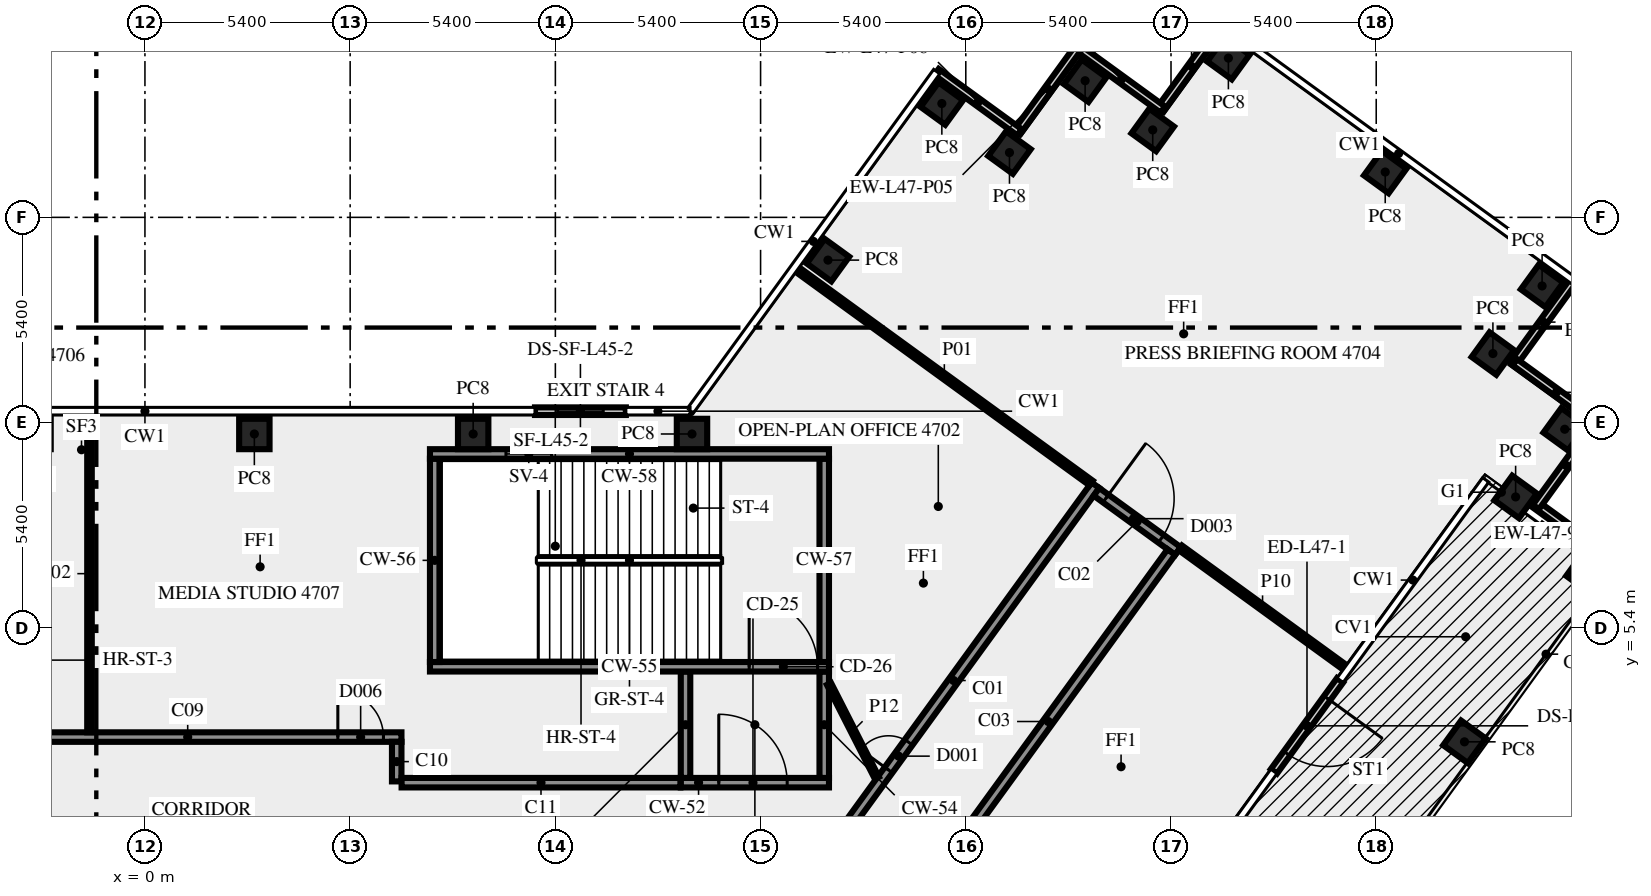
"""IFC4 building model, lengths in metres.
Left out: names, types, materials, properties, quantities, classifications, styles, units other than length and angle.
Written with IfcOpenShell. Run it as: python <this file> out.ifc"""

import sys

from ifc_helpers import new_model, si_unit, direction, frame, frame_2d, origin, origin_2d, place, context, subcontext, project, spatial, rectangle, extrude, element, fill, save


model = new_model("IFC4")
c1 = context("Model", 3, precision=1e-05, world=origin(), true_north=direction((0.0, 1.0)))
c2 = subcontext(c1, "Body", "Model", "MODEL_VIEW")
j1 = project(units=[si_unit("LENGTHUNIT", "METRE"), si_unit("PLANEANGLEUNIT", "RADIAN")], contexts=[c1])
p1 = place(None, origin())
s1 = spatial("IfcSite", under=j1, at=p1, CompositionType="ELEMENT")
p2 = place(p1, origin())
s2 = spatial("IfcBuilding", under=s1, at=p2, CompositionType="ELEMENT")
p3 = place(p2, frame((0.0, 0.0, 202.0)))
s3 = spatial("IfcBuildingStorey", under=s2, at=p3, CompositionType="ELEMENT", Elevation=202.0)
for number, where, z_axis, x_axis in (
    (1, (34.722, 2.4, 0.0), (0.0, 0.0, 1.0), (0.588, 0.809, 0.0)),
    (2, (37.96, 6.855, 0.0), (0.0, 0.0, 1.0), (0.588, 0.809, 0.0)),
    (3, (36.068, 8.844, 0.0), (0.0, 0.0, 1.0), (0.588, 0.809, 0.0)),
    (4, (37.36, 10.625, 0.0), (0.0, 0.0, 1.0), (0.588, 0.809, 0.0)),
    (5, (35.471, 12.616, 0.0), (0.0, 0.0, 1.0), (-0.809, 0.588, 0.0)),
    (6, (36.765, 14.395, 0.0), (0.0, 0.0, 1.0), (-0.809, 0.588, 0.0)),
    (7, (32.637, 17.393, 0.0), (0.0, 0.0, 1.0), (-0.809, 0.588, 0.0)),
    (8, (28.51, 20.39, 0.0), (0.0, 0.0, 1.0), (-0.588, -0.809, 0.0)),
    (9, (26.519, 18.5, 0.0), (0.0, 0.0, 1.0), (-0.809, 0.588, 0.0)),
    (10, (24.74, 19.795, 0.0), (0.0, 0.0, 1.0), (-0.588, -0.809, 0.0)),
    (11, (22.749, 17.904, 0.0), (0.0, 0.0, 1.0), (-0.588, -0.809, 0.0)),
    (12, (20.97, 19.195, 0.0), (0.0, 0.0, 1.0), (-0.588, -0.809, 0.0)),
    (13, (17.974, 15.075, 0.0), (0.0, 0.0, 1.0), (-0.588, -0.809, 0.0)),
    (14, (14.395, 10.5, 0.0), (0.0, 0.0, 1.0), (-1.0, 0.0, 0.0)),
    (15, (8.637, 10.5, 0.0), (0.0, 0.0, 1.0), (-1.0, 0.0, 0.0)),
    (16, (2.879, 10.5, 0.0), (0.0, 0.0, 1.0), (-1.0, 0.0, 0.0)),
):
    element("IfcColumn", number, at=place(p3, frame(where, z_axis=z_axis, x_axis=x_axis)), inside=s3, PredefinedType="COLUMN", context=c2, shape_type="SweptSolid", body=[
        extrude(rectangle(XDim=0.8, YDim=0.8, at=origin_2d()), origin(), (0.0, 0.0, 1.0), 3.65),
    ])
for number, where, z_axis, x_axis in (
    (17, (36.005, 12.352, 0.0), (0.0, 0.0, 1.0), (0.588, 0.809, 0.0)),
    (18, (28.334, 21.262, 0.0), (0.0, 0.0, 1.0), (-0.588, -0.809, 0.0)),
):
    element("IfcWall", number, at=place(p3, frame(where, z_axis=z_axis, x_axis=x_axis)), inside=s3, PredefinedType="SOLIDWALL", context=c2, shape_type="SweptSolid", body=[
        extrude(rectangle(XDim=2.7, YDim=0.2, at=frame_2d((1.35, 0.0))), origin(), (0.0, 0.0, 1.0), 3.65),
    ])
p4 = place(p3, frame((26.785, 19.036, 0.0), z_axis=(0.0, 0.0, 1.0), x_axis=(-0.809064397168, 0.587720002413, 0.0)))
e19 = element("IfcWall", 19, at=p4, inside=s3, PredefinedType="SOLIDWALL", context=c2, shape_type="SweptSolid", body=[
    extrude(rectangle(XDim=2.7, YDim=0.2, at=frame_2d((1.35, 0.0))), origin(), (0.0, 0.0, 1.0), 3.65),
])
for number, where, z_axis, x_axis in (
    (20, (24.563, 20.665, 0.0), (0.0, 0.0, 1.0), (-0.588, -0.809, 0.0)),
    (21, (23.013, 18.438, 0.0), (0.0, 0.0, 1.0), (-0.809, 0.588, 0.0)),
):
    element("IfcWall", number, at=place(p3, frame(where, z_axis=z_axis, x_axis=x_axis)), inside=s3, PredefinedType="SOLIDWALL", context=c2, shape_type="SweptSolid", body=[
        extrude(rectangle(XDim=2.7, YDim=0.2, at=frame_2d((1.35, 0.0))), origin(), (0.0, 0.0, 1.0), 3.65),
    ])
p5 = place(p3, frame((12.655, 11.1, 0.0), z_axis=(0.0, 0.0, 1.0), x_axis=(-1.0, 0.0, 0.0)))
e22 = element("IfcWall", 22, at=p5, inside=s3, PredefinedType="SOLIDWALL", context=c2, shape_type="SweptSolid", body=[
    extrude(rectangle(XDim=2.392, YDim=0.2, at=frame_2d((1.196, 0.0))), origin(), (0.0, 0.0, 1.0), 3.65),
])
p6 = place(p5, frame((0.596, 0.0, 1.0)))
e23 = element("IfcOpeningElement", 23, at=p6, cuts=e22, PredefinedType="OPENING", context=c2, shape_type="SweptSolid", body=[
    extrude(rectangle(XDim=1.2, YDim=1.2, at=frame_2d((0.6, 0.6))), frame((0.0, 0.11, 0.0), z_axis=(0.0, -1.0, 0.0), x_axis=(1.0, 0.0, 0.0)), (0.0, 0.0, 1.0), 0.22),
])
p7 = place(p3, frame((31.449, 4.019, 0.0), z_axis=(0.0, 0.0, 1.0), x_axis=(-0.58782869016, -0.808985433135, 0.0)))
e24 = element("IfcWall", 24, at=p7, inside=s3, PredefinedType="SOLIDWALL", context=c2, shape_type="SweptSolid", body=[
    extrude(rectangle(XDim=2.963, YDim=0.2, at=frame_2d((1.481, 0.0))), origin(), (0.0, 0.0, 1.0), 3.65),
])
p8 = place(p7, frame((0.582, 0.0, 0.0)))
e25 = element("IfcOpeningElement", 25, at=p8, cuts=e24, PredefinedType="OPENING", context=c2, shape_type="SweptSolid", body=[
    extrude(rectangle(XDim=1.8, YDim=2.4, at=frame_2d((0.9, 1.2))), frame((0.0, 0.11, 0.0), z_axis=(0.0, -1.0, 0.0), x_axis=(1.0, 0.0, 0.0)), (0.0, 0.0, 1.0), 0.22),
])
p9 = place(p3, frame((38.748, 7.09, 0.0), z_axis=(0.0, 0.0, 1.0), x_axis=(-0.80901210161, 0.587791986546, 0.0)))
e26 = element("IfcWall", 26, at=p9, inside=s3, PredefinedType="SOLIDWALL", context=c2, shape_type="SweptSolid", body=[
    extrude(rectangle(XDim=2.6, YDim=0.2, at=frame_2d((1.3, 0.0))), origin(), (0.0, 0.0, 1.0), 3.65),
])
for number, where, z_axis, x_axis in (
    (27, (36.602, 8.58, 0.0), (0.0, 0.0, 1.0), (0.588, 0.809, 0.0)),
    (28, (38.231, 10.802, 0.0), (0.0, 0.0, 1.0), (-0.809, 0.588, 0.0)),
):
    element("IfcWall", number, at=place(p3, frame(where, z_axis=z_axis, x_axis=x_axis)), inside=s3, PredefinedType="SOLIDWALL", context=c2, shape_type="SweptSolid", body=[
        extrude(rectangle(XDim=2.7, YDim=0.2, at=frame_2d((1.35, 0.0))), origin(), (0.0, 0.0, 1.0), 3.65),
    ])
p10 = place(p3, frame((14.1, 1.325, 0.0), z_axis=(0.0, 0.0, 1.0), x_axis=(1.0, 0.0, 0.0)))
e29 = element("IfcWall", 29, at=p10, inside=s3, PredefinedType="SHEAR", context=c2, shape_type="SweptSolid", body=[
    extrude(rectangle(XDim=3.9, YDim=0.25, at=frame_2d((1.95, 0.0))), origin(), (0.0, 0.0, 1.0), 3.65),
])
p11 = place(p10, frame((1.0, 0.0, 0.0)))
e30 = element("IfcOpeningElement", 30, at=p11, cuts=e29, PredefinedType="OPENING", context=c2, shape_type="SweptSolid", body=[
    extrude(rectangle(XDim=1.8, YDim=2.1, at=frame_2d((0.9, 1.05))), frame((0.0, 0.135, 0.0), z_axis=(0.0, -1.0, 0.0), x_axis=(1.0, 0.0, 0.0)), (0.0, 0.0, 1.0), 0.27),
])
for number, where, z_axis, x_axis in (
    (31, (14.225, 1.45, 0.0), (0.0, 0.0, 1.0), (0.0, 1.0, 0.0)),
    (32, (17.875, 1.45, 0.0), (0.0, 0.0, 1.0), (0.0, 1.0, 0.0)),
):
    element("IfcWall", number, at=place(p3, frame(where, z_axis=z_axis, x_axis=x_axis)), inside=s3, PredefinedType="SHEAR", context=c2, shape_type="SweptSolid", body=[
        extrude(rectangle(XDim=2.8, YDim=0.25, at=frame_2d((1.4, 0.0))), origin(), (0.0, 0.0, 1.0), 3.65),
    ])
p12 = place(p3, frame((7.5, 4.375, 0.0), z_axis=(0.0, 0.0, 1.0), x_axis=(1.0, 0.0, 0.0)))
e33 = element("IfcWall", 33, at=p12, inside=s3, PredefinedType="SHEAR", context=c2, shape_type="SweptSolid", body=[
    extrude(rectangle(XDim=10.5, YDim=0.25, at=frame_2d((5.25, 0.0))), origin(), (0.0, 0.0, 1.0), 3.65),
])
p13 = place(p12, frame((8.4, 0.0, 0.0)))
e34 = element("IfcOpeningElement", 34, at=p13, cuts=e33, PredefinedType="OPENING", context=c2, shape_type="SweptSolid", body=[
    extrude(rectangle(XDim=1.8, YDim=2.1, at=frame_2d((0.9, 1.05))), frame((0.0, 0.135, 0.0), z_axis=(0.0, -1.0, 0.0), x_axis=(1.0, 0.0, 0.0)), (0.0, 0.0, 1.0), 0.27),
])
for number, where, z_axis, x_axis in (
    (35, (7.625, 4.5, 0.0), (0.0, 0.0, 1.0), (0.0, 1.0, 0.0)),
    (36, (17.875, 4.5, 0.0), (0.0, 0.0, 1.0), (0.0, 1.0, 0.0)),
):
    element("IfcWall", number, at=place(p3, frame(where, z_axis=z_axis, x_axis=x_axis)), inside=s3, PredefinedType="SHEAR", context=c2, shape_type="SweptSolid", body=[
        extrude(rectangle(XDim=5.35, YDim=0.25, at=frame_2d((2.675, 0.0))), origin(), (0.0, 0.0, 1.0), 3.65),
    ])
p14 = place(p3, frame((7.5, 9.975, 0.0), z_axis=(0.0, 0.0, 1.0), x_axis=(1.0, 0.0, 0.0)))
e37 = element("IfcWall", 37, at=p14, inside=s3, PredefinedType="SHEAR", context=c2, shape_type="SweptSolid", body=[
    extrude(rectangle(XDim=10.5, YDim=0.25, at=frame_2d((5.25, 0.0))), origin(), (0.0, 0.0, 1.0), 3.65),
])
p15 = place(p14, frame((2.0, 0.0, 1.0)))
e38 = element("IfcOpeningElement", 38, at=p15, cuts=e37, PredefinedType="OPENING", context=c2, shape_type="SweptSolid", body=[
    extrude(rectangle(XDim=1.2, YDim=1.2, at=frame_2d((0.6, 0.6))), frame((0.0, 0.135, 0.0), z_axis=(0.0, -1.0, 0.0), x_axis=(1.0, 0.0, 0.0)), (0.0, 0.0, 1.0), 0.27),
])
p16 = place(p3, frame((17.545, -1.125, 0.0), z_axis=(0.0, 0.0, 1.0), x_axis=(0.587796810203, 0.809008596935, 0.0)))
e39 = element("IfcWall", 39, at=p16, inside=s3, PredefinedType="SOLIDWALL", context=c2, shape_type="SweptSolid", body=[
    extrude(rectangle(XDim=12.703, YDim=0.25, at=frame_2d((6.352, 0.0))), origin(), (0.0, 0.0, 1.0), 3.65),
])
p17 = place(p16, frame((3.441, 0.0, 0.0)))
e40 = element("IfcOpeningElement", 40, at=p17, cuts=e39, PredefinedType="OPENING", context=c2, shape_type="SweptSolid", body=[
    extrude(rectangle(XDim=0.9, YDim=2.1, at=frame_2d((0.45, 1.05))), frame((0.0, 0.135, 0.0), z_axis=(0.0, -1.0, 0.0), x_axis=(1.0, 0.0, 0.0)), (0.0, 0.0, 1.0), 0.27),
])
p18 = place(p3, frame((25.039, 8.978, 0.0), z_axis=(0.0, 0.0, 1.0), x_axis=(0.809006914995, -0.587799125119, 0.0)))
e41 = element("IfcWall", 41, at=p18, inside=s3, PredefinedType="SOLIDWALL", context=c2, shape_type="SweptSolid", body=[
    extrude(rectangle(XDim=2.65, YDim=0.25, at=frame_2d((1.325, 0.0))), origin(), (0.0, 0.0, 1.0), 3.65),
])
p19 = place(p18, frame((0.301, 0.0, 0.0)))
e42 = element("IfcOpeningElement", 42, at=p19, cuts=e41, PredefinedType="OPENING", context=c2, shape_type="SweptSolid", body=[
    extrude(rectangle(XDim=1.8, YDim=2.1, at=frame_2d((0.9, 1.05))), frame((0.0, 0.135, 0.0), z_axis=(0.0, -1.0, 0.0), x_axis=(1.0, 0.0, 0.0)), (0.0, 0.0, 1.0), 0.27),
])
p20 = place(p3, frame((27.009, 7.392, 0.0), z_axis=(0.0, 0.0, 1.0), x_axis=(-0.587776457057, -0.809023384414, 0.0)))
e43 = element("IfcWall", 43, at=p20, inside=s3, PredefinedType="SOLIDWALL", context=c2, shape_type="SweptSolid", body=[
    extrude(rectangle(XDim=11.021, YDim=0.25, at=frame_2d((5.51, 0.0))), origin(), (0.0, 0.0, 1.0), 3.65),
])
p21 = place(p20, frame((9.588, 0.0, 0.0)))
e44 = element("IfcOpeningElement", 44, at=p21, cuts=e43, PredefinedType="OPENING", context=c2, shape_type="SweptSolid", body=[
    extrude(rectangle(XDim=0.9, YDim=2.1, at=frame_2d((0.45, 1.05))), frame((0.0, 0.135, 0.0), z_axis=(0.0, -1.0, 0.0), x_axis=(1.0, 0.0, 0.0)), (0.0, 0.0, 1.0), 0.27),
])
p22 = place(p3, frame((-4.5, 2.525, 0.0), z_axis=(0.0, 0.0, 1.0), x_axis=(1.0, 0.0, 0.0)))
e45 = element("IfcWall", 45, at=p22, inside=s3, PredefinedType="SOLIDWALL", context=c2, shape_type="SweptSolid", body=[
    extrude(rectangle(XDim=11.25, YDim=0.25, at=frame_2d((5.625, 0.0))), origin(), (0.0, 0.0, 1.0), 3.65),
])
p23 = place(p22, frame((0.224, 0.0, 0.0)))
e46 = element("IfcOpeningElement", 46, at=p23, cuts=e45, PredefinedType="OPENING", context=c2, shape_type="SweptSolid", body=[
    extrude(rectangle(XDim=0.9, YDim=2.1, at=frame_2d((0.45, 1.05))), frame((0.0, 0.135, 0.0), z_axis=(0.0, -1.0, 0.0), x_axis=(1.0, 0.0, 0.0)), (0.0, 0.0, 1.0), 0.27),
])
p24 = place(p22, frame((9.576, 0.0, 0.0)))
e47 = element("IfcOpeningElement", 47, at=p24, cuts=e45, PredefinedType="OPENING", context=c2, shape_type="SweptSolid", body=[
    extrude(rectangle(XDim=1.2, YDim=2.1, at=frame_2d((0.6, 1.05))), frame((0.0, 0.135, 0.0), z_axis=(0.0, -1.0, 0.0), x_axis=(1.0, 0.0, 0.0)), (0.0, 0.0, 1.0), 0.27),
])
p25 = place(p3, frame((6.625, 2.4, 0.0), z_axis=(0.0, 0.0, 1.0), x_axis=(0.0, -1.0, 0.0)))
e48 = element("IfcWall", 48, at=p25, inside=s3, PredefinedType="SOLIDWALL", context=c2, shape_type="SweptSolid", body=[
    extrude(rectangle(XDim=1.041, YDim=0.25, at=frame_2d((0.521, 0.0))), origin(), (0.0, 0.0, 1.0), 3.65),
])
p26 = place(p3, frame((6.754, 1.325, 0.0), z_axis=(0.0, 0.0, 1.0), x_axis=(1.0, 0.0, 0.0)))
e49 = element("IfcWall", 49, at=p26, inside=s3, PredefinedType="SOLIDWALL", context=c2, shape_type="SweptSolid", body=[
    extrude(rectangle(XDim=7.336, YDim=0.25, at=frame_2d((3.668, 0.0))), origin(), (0.0, 0.0, 1.0), 3.65),
])
p27 = place(p3, frame((24.898, 9.21, 0.0), z_axis=(0.0, 0.0, 1.0), x_axis=(-0.809034479891, 0.587761184791, 0.0)))
e50 = element("IfcWall", 50, at=p27, inside=s3, PredefinedType="PARTITIONING", context=c2, shape_type="SweptSolid", body=[
    extrude(rectangle(XDim=9.55, YDim=0.15, at=frame_2d((4.775, 0.0))), origin(), (0.0, 0.0, 1.0), 2.85),
])
p28 = place(p3, frame((-1.459, 2.65, 0.0), z_axis=(0.0, 0.0, 1.0), x_axis=(0.0, 1.0, 0.0)))
e51 = element("IfcWall", 51, at=p28, inside=s3, PredefinedType="PARTITIONING", context=c2, shape_type="SweptSolid", body=[
    extrude(rectangle(XDim=8.35, YDim=0.12, at=frame_2d((4.175, 0.0))), origin(), (0.0, 0.0, 1.0), 2.85),
])
p29 = place(p3, frame((31.573, 4.36, 0.0), z_axis=(0.0, 0.0, 1.0), x_axis=(-0.809041862067, 0.587751023328, 0.0)))
e52 = element("IfcWall", 52, at=p29, inside=s3, PredefinedType="PARTITIONING", context=c2, shape_type="SweptSolid", body=[
    extrude(rectangle(XDim=5.35, YDim=0.15, at=frame_2d((2.675, 0.0))), origin(), (0.0, 0.0, 1.0), 3.65),
])
p30 = place(p3, frame((18.0, 3.925, 0.0), z_axis=(0.0, 0.0, 1.0), x_axis=(0.453950796792, -0.891026752736, 0.0)))
e53 = element("IfcWall", 53, at=p30, inside=s3, PredefinedType="PARTITIONING", context=c2, shape_type="SweptSolid", body=[
    extrude(rectangle(XDim=2.778, YDim=0.12, at=frame_2d((1.389, 0.0))), origin(), (0.0, 0.0, 1.0), 3.65),
])
p31 = place(p6, origin())
e54 = element("IfcWindow", 54, at=p31, inside=s3, PartitioningType="SINGLE_PANEL", PredefinedType="WINDOW", context=c2, shape_type="SweptSolid", body=[
    extrude(rectangle(XDim=1.2, YDim=1.2, at=frame_2d((0.6, 0.6))), frame((0.0, 0.03, 0.0), z_axis=(0.0, -1.0, 0.0), x_axis=(1.0, 0.0, 0.0)), (0.0, 0.0, 1.0), 0.06),
])
fill(e23, e54)
p32 = place(p8, origin())
e55 = element("IfcDoor", 55, at=p32, inside=s3, OperationType="DOUBLE_DOOR_SINGLE_SWING", PredefinedType="DOOR", context=c2, shape_type="SweptSolid", body=[
    extrude(rectangle(XDim=1.8, YDim=2.4, at=frame_2d((0.9, 1.2))), frame((0.0, 0.025, 0.0), z_axis=(0.0, -1.0, 0.0), x_axis=(1.0, 0.0, 0.0)), (0.0, 0.0, 1.0), 0.05),
])
fill(e25, e55)
p33 = place(p11, origin())
e56 = element("IfcDoor", 56, at=p33, inside=s3, OperationType="DOUBLE_DOOR_SINGLE_SWING", PredefinedType="DOOR", context=c2, shape_type="SweptSolid", body=[
    extrude(rectangle(XDim=1.8, YDim=2.1, at=frame_2d((0.9, 1.05))), frame((0.0, 0.025, 0.0), z_axis=(0.0, -1.0, 0.0), x_axis=(1.0, 0.0, 0.0)), (0.0, 0.0, 1.0), 0.05),
])
fill(e30, e56)
p34 = place(p13, origin())
e57 = element("IfcDoor", 57, at=p34, inside=s3, OperationType="DOUBLE_DOOR_SINGLE_SWING", PredefinedType="DOOR", context=c2, shape_type="SweptSolid", body=[
    extrude(rectangle(XDim=1.8, YDim=2.1, at=frame_2d((0.9, 1.05))), frame((0.0, 0.025, 0.0), z_axis=(0.0, -1.0, 0.0), x_axis=(1.0, 0.0, 0.0)), (0.0, 0.0, 1.0), 0.05),
])
fill(e34, e57)
p35 = place(p15, origin())
e58 = element("IfcWindow", 58, at=p35, inside=s3, PartitioningType="SINGLE_PANEL", PredefinedType="WINDOW", context=c2, shape_type="SweptSolid", body=[
    extrude(rectangle(XDim=1.2, YDim=1.2, at=frame_2d((0.6, 0.6))), frame((0.0, 0.03, 0.0), z_axis=(0.0, -1.0, 0.0), x_axis=(1.0, 0.0, 0.0)), (0.0, 0.0, 1.0), 0.06),
])
fill(e38, e58)
p36 = place(p17, origin())
e59 = element("IfcDoor", 59, at=p36, inside=s3, OperationType="SINGLE_SWING_LEFT", PredefinedType="DOOR", context=c2, shape_type="SweptSolid", body=[
    extrude(rectangle(XDim=0.9, YDim=2.1, at=frame_2d((0.45, 1.05))), frame((0.0, 0.025, 0.0), z_axis=(0.0, -1.0, 0.0), x_axis=(1.0, 0.0, 0.0)), (0.0, 0.0, 1.0), 0.05),
])
fill(e40, e59)
p37 = place(p19, origin())
e60 = element("IfcDoor", 60, at=p37, inside=s3, OperationType="DOUBLE_DOOR_SINGLE_SWING", PredefinedType="DOOR", context=c2, shape_type="SweptSolid", body=[
    extrude(rectangle(XDim=1.8, YDim=2.1, at=frame_2d((0.9, 1.05))), frame((0.0, 0.025, 0.0), z_axis=(0.0, -1.0, 0.0), x_axis=(1.0, 0.0, 0.0)), (0.0, 0.0, 1.0), 0.05),
])
fill(e42, e60)
p38 = place(p24, origin())
e61 = element("IfcDoor", 61, at=p38, inside=s3, OperationType="SINGLE_SWING_RIGHT", PredefinedType="DOOR", context=c2, shape_type="SweptSolid", body=[
    extrude(rectangle(XDim=1.2, YDim=2.1, at=frame_2d((0.6, 1.05))), frame((0.0, 0.025, 0.0), z_axis=(0.0, -1.0, 0.0), x_axis=(1.0, 0.0, 0.0)), (0.0, 0.0, 1.0), 0.05),
])
fill(e47, e61)
save(model, sys.argv[1])
